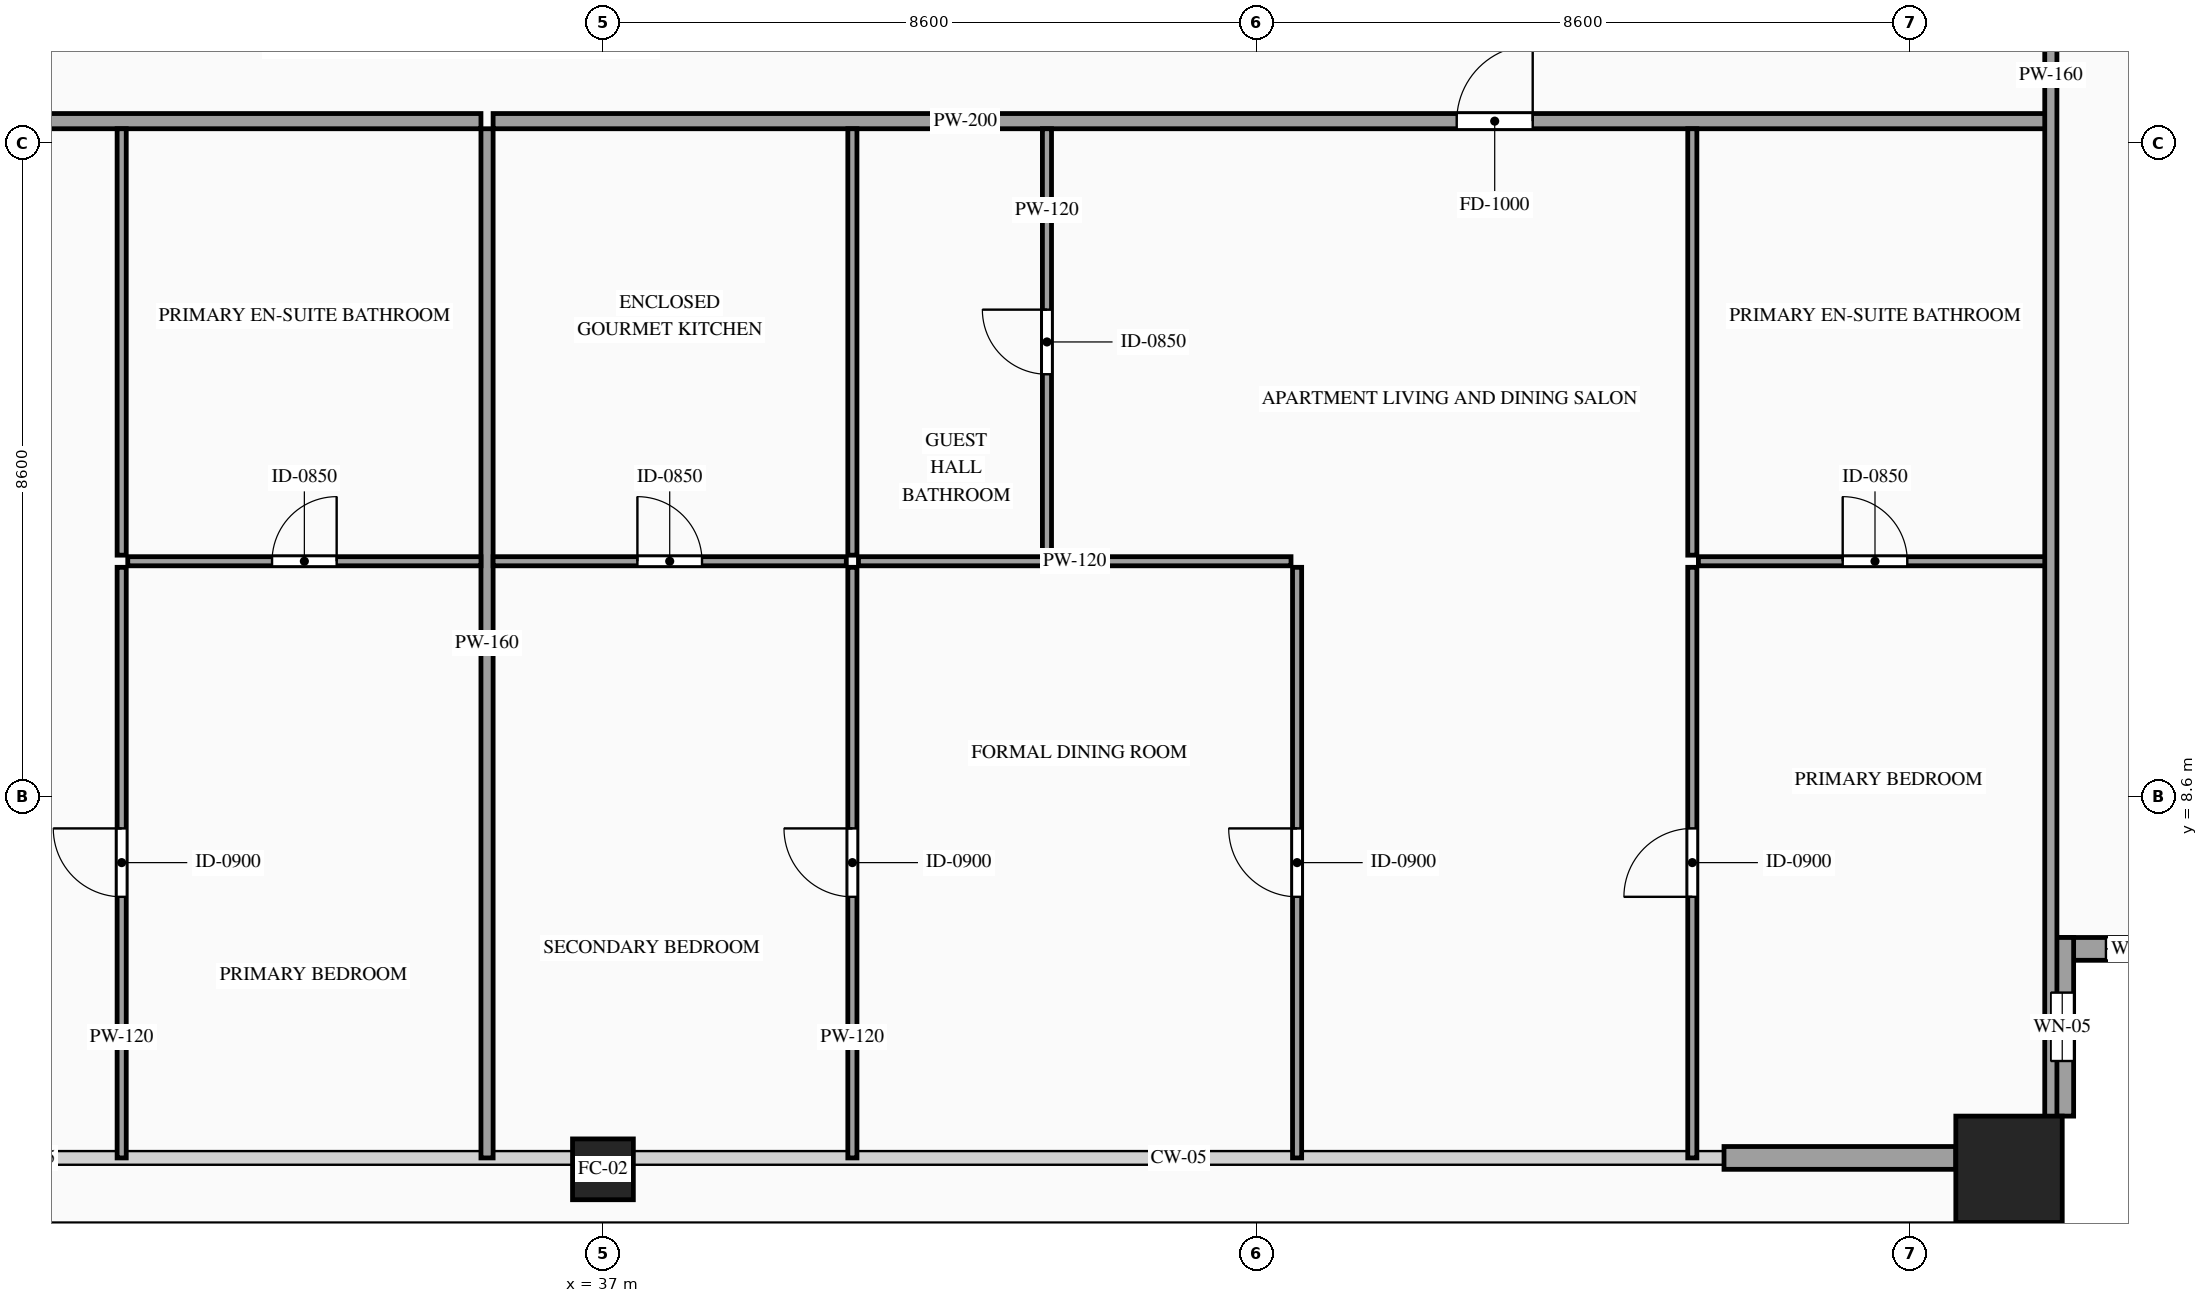
"""IFC4 building model, lengths in metres.
Left out: names, types, materials, properties, quantities, classifications, styles, units other than length and angle.
Written with IfcOpenShell. Run it as: python <this file> out.ifc"""

import sys

from ifc_helpers import new_model, si_unit, direction, frame, frame_2d, origin, origin_2d, place, context, subcontext, project, spatial, rectangle, hollow_rectangle, extrude, source, transform, mapped, element, fill, save


model = new_model("IFC4")
c1 = context("Model", 3, precision=1e-05, world=origin(), true_north=direction((0.0, 1.0)))
c2 = subcontext(c1, "Body", "Model", "MODEL_VIEW")
j1 = project(units=[si_unit("LENGTHUNIT", "METRE"), si_unit("PLANEANGLEUNIT", "RADIAN")], contexts=[c1])
p1 = place(None, origin())
s1 = spatial("IfcSite", under=j1, at=p1, CompositionType="ELEMENT")
p2 = place(p1, origin())
s2 = spatial("IfcBuilding", under=s1, at=p2, CompositionType="ELEMENT")
p3 = place(p2, frame((0.0, 0.0, 216.0)))
s3 = spatial("IfcBuildingStorey", under=s2, at=p3, CompositionType="ELEMENT", Elevation=216.0)
m1 = source(origin(), c2, "Body", "SweptSolid", [
    extrude(hollow_rectangle(XDim=0.8, YDim=0.8, WallThickness=0.036, at=origin_2d()), origin(), (0.0, 0.0, 1.0), 3.22),
])
p4 = place(p3, frame((37.0, 3.7, 0.0), z_axis=(0.0, 0.0, 1.0), x_axis=(1.0, 0.0, 0.0)))
e1 = element("IfcColumn", 1, at=p4, inside=s3, PredefinedType="COLUMN", context=c2, shape_type="MappedRepresentation", body=[
    mapped(m1, transform((0.0, 0.0, 0.0), scale=1.0)),
])
m2 = source(origin(), c2, "Body", "SweptSolid", [
    extrude(hollow_rectangle(XDim=1.4, YDim=1.4, WallThickness=0.06, at=origin_2d()), origin(), (0.0, 0.0, 1.0), 3.22),
])
p5 = place(p3, frame((55.5, 3.7, 0.0), z_axis=(0.0, 0.0, 1.0), x_axis=(1.0, 0.0, 0.0)))
e2 = element("IfcColumn", 2, at=p5, inside=s3, PredefinedType="COLUMN", context=c2, shape_type="MappedRepresentation", body=[
    mapped(m2, transform((0.0, 0.0, 0.0), scale=1.0)),
])
p6 = place(p3, frame((56.05, 6.6, 0.0), z_axis=(0.0, 0.0, 1.0), x_axis=(1.0, 0.0, 0.0)))
e3 = element("IfcWall", 3, at=p6, inside=s3, PredefinedType="SOLIDWALL", context=c2, shape_type="SweptSolid", body=[
    extrude(rectangle(XDim=2.35, YDim=0.3, at=frame_2d((1.175, 0.0))), origin(), (0.0, 0.0, 1.0), 3.22),
])
p7 = place(p6, frame((0.725, 0.0, 0.75)))
e4 = element("IfcOpeningElement", 4, at=p7, cuts=e3, PredefinedType="OPENING", context=c2, shape_type="SweptSolid", body=[
    extrude(rectangle(XDim=0.9, YDim=1.5, at=frame_2d((0.45, 0.75))), frame((0.0, 0.165, 0.0), z_axis=(0.0, -1.0, 0.0), x_axis=(1.0, 0.0, 0.0)), (0.0, 0.0, 1.0), 0.33),
])
p8 = place(p3, frame((56.2, 4.4, 0.0), z_axis=(0.0, 0.0, 1.0), x_axis=(0.0, 1.0, 0.0)))
e5 = element("IfcWall", 5, at=p8, inside=s3, PredefinedType="SOLIDWALL", context=c2, shape_type="SweptSolid", body=[
    extrude(rectangle(XDim=2.35, YDim=0.3, at=frame_2d((1.175, 0.0))), origin(), (0.0, 0.0, 1.0), 3.22),
])
p9 = place(p8, frame((0.725, 0.0, 0.75)))
e6 = element("IfcOpeningElement", 6, at=p9, cuts=e5, PredefinedType="OPENING", context=c2, shape_type="SweptSolid", body=[
    extrude(rectangle(XDim=0.9, YDim=1.5, at=frame_2d((0.45, 0.75))), frame((0.0, 0.165, 0.0), z_axis=(0.0, -1.0, 0.0), x_axis=(1.0, 0.0, 0.0)), (0.0, 0.0, 1.0), 0.33),
])
m3 = source(origin(), c2, "Body", "SweptSolid", [
    extrude(rectangle(XDim=3.05, YDim=0.3, at=frame_2d((1.525, 0.0))), origin(), (0.0, 0.0, 1.0), 2.775),
])
p10 = place(p3, frame((51.75, 3.85, 0.0), z_axis=(0.0, 0.0, 1.0), x_axis=(1.0, 0.0, 0.0)))
e7 = element("IfcWall", 7, at=p10, inside=s3, PredefinedType="SOLIDWALL", context=c2, shape_type="MappedRepresentation", body=[
    mapped(m3, transform((0.0, 0.0, 0.0), scale=1.0)),
])
p11 = place(p3, frame((17.94, 17.49, 0.0), z_axis=(0.0, 0.0, 1.0), x_axis=(1.0, 0.0, 0.0)))
e8 = element("IfcWall", 8, at=p11, inside=s3, PredefinedType="PARTITIONING", context=c2, shape_type="SweptSolid", body=[
    extrude(rectangle(XDim=17.455, YDim=0.2, at=frame_2d((8.728, 0.0))), origin(), (0.0, 0.0, 1.0), 3.22),
])
p12 = place(p11, frame((10.033, 0.0, 0.0)))
e9 = element("IfcOpeningElement", 9, at=p12, cuts=e8, PredefinedType="OPENING", context=c2, shape_type="SweptSolid", body=[
    extrude(rectangle(XDim=1.0, YDim=2.2, at=frame_2d((0.5, 1.1))), frame((0.0, 0.115, 0.0), z_axis=(0.0, -1.0, 0.0), x_axis=(1.0, 0.0, 0.0)), (0.0, 0.0, 1.0), 0.23),
])
m4 = source(origin(), c2, "Body", "SweptSolid", [
    extrude(rectangle(XDim=13.54, YDim=0.16, at=frame_2d((6.77, 0.0))), origin(), (0.0, 0.0, 1.0), 3.22),
])
p13 = place(p3, frame((35.475, 3.85, 0.0), z_axis=(0.0, 0.0, 1.0), x_axis=(0.0, 1.0, 0.0)))
e10 = element("IfcWall", 10, at=p13, inside=s3, PredefinedType="PARTITIONING", context=c2, shape_type="MappedRepresentation", body=[
    mapped(m4, transform((0.0, 0.0, 0.0), scale=1.0)),
])
p14 = place(p3, frame((30.748, 11.7, 0.0), z_axis=(0.0, 0.0, 1.0), x_axis=(1.0, 0.0, 0.0)))
e11 = element("IfcWall", 11, at=p14, inside=s3, PredefinedType="PARTITIONING", context=c2, shape_type="SweptSolid", body=[
    extrude(rectangle(XDim=4.647, YDim=0.12, at=frame_2d((2.323, 0.0))), origin(), (0.0, 0.0, 1.0), 3.22),
])
p15 = place(p14, frame((1.898, 0.0, 0.0)))
e12 = element("IfcOpeningElement", 12, at=p15, cuts=e11, PredefinedType="OPENING", context=c2, shape_type="SweptSolid", body=[
    extrude(rectangle(XDim=0.85, YDim=2.1, at=frame_2d((0.425, 1.05))), frame((0.0, 0.075, 0.0), z_axis=(0.0, -1.0, 0.0), x_axis=(1.0, 0.0, 0.0)), (0.0, 0.0, 1.0), 0.15),
])
m5 = source(origin(), c2, "Body", "SweptSolid", [
    extrude(rectangle(XDim=5.61, YDim=0.12, at=frame_2d((2.805, 0.0))), origin(), (0.0, 0.0, 1.0), 3.22),
])
p16 = place(p3, frame((30.668, 11.78, 0.0), z_axis=(0.0, 0.0, 1.0), x_axis=(0.0, 1.0, 0.0)))
e13 = element("IfcWall", 13, at=p16, inside=s3, PredefinedType="PARTITIONING", context=c2, shape_type="MappedRepresentation", body=[
    mapped(m5, transform((0.0, 0.0, 0.0), scale=1.0)),
])
p17 = place(p3, frame((30.668, 3.85, 0.0), z_axis=(0.0, 0.0, 1.0), x_axis=(0.0, 1.0, 0.0)))
e14 = element("IfcWall", 14, at=p17, inside=s3, PredefinedType="PARTITIONING", context=c2, shape_type="SweptSolid", body=[
    extrude(rectangle(XDim=7.77, YDim=0.12, at=frame_2d((3.885, 0.0))), origin(), (0.0, 0.0, 1.0), 3.22),
])
p18 = place(p17, frame((3.435, 0.0, 0.0)))
e15 = element("IfcOpeningElement", 15, at=p18, cuts=e14, PredefinedType="OPENING", context=c2, shape_type="SweptSolid", body=[
    extrude(rectangle(XDim=0.9, YDim=2.15, at=frame_2d((0.45, 1.075))), frame((0.0, 0.075, 0.0), z_axis=(0.0, -1.0, 0.0), x_axis=(1.0, 0.0, 0.0)), (0.0, 0.0, 1.0), 0.15),
])
p19 = place(p3, frame((35.555, 17.49, 0.0), z_axis=(0.0, 0.0, 1.0), x_axis=(1.0, 0.0, 0.0)))
e16 = element("IfcWall", 16, at=p19, inside=s3, PredefinedType="PARTITIONING", context=c2, shape_type="SweptSolid", body=[
    extrude(rectangle(XDim=20.505, YDim=0.2, at=frame_2d((10.252, 0.0))), origin(), (0.0, 0.0, 1.0), 3.22),
])
p20 = place(p19, frame((12.678, 0.0, 0.0)))
e17 = element("IfcOpeningElement", 17, at=p20, cuts=e16, PredefinedType="OPENING", context=c2, shape_type="SweptSolid", body=[
    extrude(rectangle(XDim=1.0, YDim=2.2, at=frame_2d((0.5, 1.1))), frame((0.0, 0.115, 0.0), z_axis=(0.0, -1.0, 0.0), x_axis=(1.0, 0.0, 0.0)), (0.0, 0.0, 1.0), 0.23),
])
p21 = place(p3, frame((35.555, 11.7, 0.0), z_axis=(0.0, 0.0, 1.0), x_axis=(1.0, 0.0, 0.0)))
e18 = element("IfcWall", 18, at=p21, inside=s3, PredefinedType="PARTITIONING", context=c2, shape_type="SweptSolid", body=[
    extrude(rectangle(XDim=4.647, YDim=0.12, at=frame_2d((2.323, 0.0))), origin(), (0.0, 0.0, 1.0), 3.22),
])
p22 = place(p21, frame((1.898, 0.0, 0.0)))
e19 = element("IfcOpeningElement", 19, at=p22, cuts=e18, PredefinedType="OPENING", context=c2, shape_type="SweptSolid", body=[
    extrude(rectangle(XDim=0.85, YDim=2.1, at=frame_2d((0.425, 1.05))), frame((0.0, 0.075, 0.0), z_axis=(0.0, -1.0, 0.0), x_axis=(1.0, 0.0, 0.0)), (0.0, 0.0, 1.0), 0.15),
])
p23 = place(p3, frame((40.282, 11.78, 0.0), z_axis=(0.0, 0.0, 1.0), x_axis=(0.0, 1.0, 0.0)))
e20 = element("IfcWall", 20, at=p23, inside=s3, PredefinedType="PARTITIONING", context=c2, shape_type="MappedRepresentation", body=[
    mapped(m5, transform((0.0, 0.0, 0.0), scale=1.0)),
])
p24 = place(p3, frame((42.842, 11.78, 0.0), z_axis=(0.0, 0.0, 1.0), x_axis=(0.0, 1.0, 0.0)))
e21 = element("IfcWall", 21, at=p24, inside=s3, PredefinedType="PARTITIONING", context=c2, shape_type="SweptSolid", body=[
    extrude(rectangle(XDim=5.61, YDim=0.12, at=frame_2d((2.805, 0.0))), origin(), (0.0, 0.0, 1.0), 3.22),
])
p25 = place(p24, frame((2.38, 0.0, 0.0)))
e22 = element("IfcOpeningElement", 22, at=p25, cuts=e21, PredefinedType="OPENING", context=c2, shape_type="SweptSolid", body=[
    extrude(rectangle(XDim=0.85, YDim=2.1, at=frame_2d((0.425, 1.05))), frame((0.0, 0.075, 0.0), z_axis=(0.0, -1.0, 0.0), x_axis=(1.0, 0.0, 0.0)), (0.0, 0.0, 1.0), 0.15),
])
p26 = place(p3, frame((51.413, 11.7, 0.0), z_axis=(0.0, 0.0, 1.0), x_axis=(1.0, 0.0, 0.0)))
e23 = element("IfcWall", 23, at=p26, inside=s3, PredefinedType="PARTITIONING", context=c2, shape_type="SweptSolid", body=[
    extrude(rectangle(XDim=4.647, YDim=0.12, at=frame_2d((2.323, 0.0))), origin(), (0.0, 0.0, 1.0), 3.22),
])
p27 = place(p26, frame((1.898, 0.0, 0.0)))
e24 = element("IfcOpeningElement", 24, at=p27, cuts=e23, PredefinedType="OPENING", context=c2, shape_type="SweptSolid", body=[
    extrude(rectangle(XDim=0.85, YDim=2.1, at=frame_2d((0.425, 1.05))), frame((0.0, 0.075, 0.0), z_axis=(0.0, -1.0, 0.0), x_axis=(1.0, 0.0, 0.0)), (0.0, 0.0, 1.0), 0.15),
])
m6 = source(origin(), c2, "Body", "SweptSolid", [
    extrude(rectangle(XDim=5.61, YDim=0.12, at=frame_2d((2.805, 0.0))), origin(), (0.0, 0.0, 1.0), 1.615),
])
p28 = place(p3, frame((51.333, 11.78, 0.0), z_axis=(0.0, 0.0, 1.0), x_axis=(0.0, 1.0, 0.0)))
e25 = element("IfcWall", 25, at=p28, inside=s3, PredefinedType="PARTITIONING", context=c2, shape_type="MappedRepresentation", body=[
    mapped(m6, transform((0.0, 0.0, 0.0), scale=1.0)),
])
p29 = place(p3, frame((40.282, 3.85, 0.0), z_axis=(0.0, 0.0, 1.0), x_axis=(0.0, 1.0, 0.0)))
e26 = element("IfcWall", 26, at=p29, inside=s3, PredefinedType="PARTITIONING", context=c2, shape_type="SweptSolid", body=[
    extrude(rectangle(XDim=7.77, YDim=0.12, at=frame_2d((3.885, 0.0))), origin(), (0.0, 0.0, 1.0), 3.22),
])
p30 = place(p29, frame((3.435, 0.0, 0.0)))
e27 = element("IfcOpeningElement", 27, at=p30, cuts=e26, PredefinedType="OPENING", context=c2, shape_type="SweptSolid", body=[
    extrude(rectangle(XDim=0.9, YDim=2.15, at=frame_2d((0.45, 1.075))), frame((0.0, 0.075, 0.0), z_axis=(0.0, -1.0, 0.0), x_axis=(1.0, 0.0, 0.0)), (0.0, 0.0, 1.0), 0.15),
])
p31 = place(p3, frame((51.333, 3.85, 0.0), z_axis=(0.0, 0.0, 1.0), x_axis=(0.0, 1.0, 0.0)))
e28 = element("IfcWall", 28, at=p31, inside=s3, PredefinedType="PARTITIONING", context=c2, shape_type="SweptSolid", body=[
    extrude(rectangle(XDim=7.77, YDim=0.12, at=frame_2d((3.885, 0.0))), origin(), (0.0, 0.0, 1.0), 3.22),
])
p32 = place(p31, frame((3.435, 0.0, 0.0)))
e29 = element("IfcOpeningElement", 29, at=p32, cuts=e28, PredefinedType="OPENING", context=c2, shape_type="SweptSolid", body=[
    extrude(rectangle(XDim=0.9, YDim=2.15, at=frame_2d((0.45, 1.075))), frame((0.0, 0.075, 0.0), z_axis=(0.0, -1.0, 0.0), x_axis=(1.0, 0.0, 0.0)), (0.0, 0.0, 1.0), 0.15),
])
m7 = source(origin(), c2, "Body", "SweptSolid", [
    extrude(rectangle(XDim=5.691, YDim=0.12, at=frame_2d((2.845, 0.0))), origin(), (0.0, 0.0, 1.0), 3.22),
])
p33 = place(p3, frame((40.362, 11.7, 0.0), z_axis=(0.0, 0.0, 1.0), x_axis=(1.0, 0.0, 0.0)))
e30 = element("IfcWall", 30, at=p33, inside=s3, PredefinedType="PARTITIONING", context=c2, shape_type="MappedRepresentation", body=[
    mapped(m7, transform((0.0, 0.0, 0.0), scale=1.0)),
])
p34 = place(p3, frame((46.133, 3.85, 0.0), z_axis=(0.0, 0.0, 1.0), x_axis=(0.0, 1.0, 0.0)))
e31 = element("IfcWall", 31, at=p34, inside=s3, PredefinedType="PARTITIONING", context=c2, shape_type="SweptSolid", body=[
    extrude(rectangle(XDim=7.77, YDim=0.12, at=frame_2d((3.885, 0.0))), origin(), (0.0, 0.0, 1.0), 3.22),
])
p35 = place(p34, frame((3.435, 0.0, 0.0)))
e32 = element("IfcOpeningElement", 32, at=p35, cuts=e31, PredefinedType="OPENING", context=c2, shape_type="SweptSolid", body=[
    extrude(rectangle(XDim=0.9, YDim=2.15, at=frame_2d((0.45, 1.075))), frame((0.0, 0.075, 0.0), z_axis=(0.0, -1.0, 0.0), x_axis=(1.0, 0.0, 0.0)), (0.0, 0.0, 1.0), 0.15),
])
m8 = source(origin(), c2, "Body", "SweptSolid", [
    extrude(rectangle(XDim=28.19, YDim=0.16, at=frame_2d((14.095, 0.0))), origin(), (0.0, 0.0, 1.0), 3.22),
])
p36 = place(p3, frame((56.05, 4.0, 0.0), z_axis=(0.0, 0.0, 1.0), x_axis=(0.0, 1.0, 0.0)))
e33 = element("IfcWall", 33, at=p36, inside=s3, PredefinedType="PARTITIONING", context=c2, shape_type="MappedRepresentation", body=[
    mapped(m8, transform((0.0, 0.0, 0.0), scale=1.0)),
])
m9 = source(origin(), c2, "Body", "SweptSolid", [
    extrude(rectangle(XDim=0.9, YDim=1.5, at=frame_2d((0.45, 0.75))), frame((0.0, 0.03, 0.0), z_axis=(0.0, -1.0, 0.0), x_axis=(1.0, 0.0, 0.0)), (0.0, 0.0, 1.0), 0.06),
])
p37 = place(p7, origin())
e34 = element("IfcWindow", 34, at=p37, inside=s3, PartitioningType="SINGLE_PANEL", PredefinedType="WINDOW", context=c2, shape_type="MappedRepresentation", body=[
    mapped(m9, transform((0.0, 0.0, 0.0), scale=1.0)),
])
fill(e4, e34)
p38 = place(p9, origin())
e35 = element("IfcWindow", 35, at=p38, inside=s3, PartitioningType="SINGLE_PANEL", PredefinedType="WINDOW", context=c2, shape_type="MappedRepresentation", body=[
    mapped(m9, transform((0.0, 0.0, 0.0), scale=1.0)),
])
fill(e6, e35)
m10 = source(origin(), c2, "Body", "SweptSolid", [
    extrude(rectangle(XDim=0.85, YDim=2.1, at=frame_2d((0.425, 1.05))), frame((0.0, 0.025, 0.0), z_axis=(0.0, -1.0, 0.0), x_axis=(1.0, 0.0, 0.0)), (0.0, 0.0, 1.0), 0.05),
])
p39 = place(p15, origin())
e36 = element("IfcDoor", 36, at=p39, inside=s3, OperationType="SINGLE_SWING_RIGHT", PredefinedType="DOOR", context=c2, shape_type="MappedRepresentation", body=[
    mapped(m10, transform((0.0, 0.0, 0.0), scale=1.0)),
])
fill(e12, e36)
m11 = source(origin(), c2, "Body", "SweptSolid", [
    extrude(rectangle(XDim=0.9, YDim=2.15, at=frame_2d((0.45, 1.075))), frame((0.0, 0.025, 0.0), z_axis=(0.0, -1.0, 0.0), x_axis=(1.0, 0.0, 0.0)), (0.0, 0.0, 1.0), 0.05),
])
p40 = place(p18, origin())
e37 = element("IfcDoor", 37, at=p40, inside=s3, OperationType="SINGLE_SWING_RIGHT", PredefinedType="DOOR", context=c2, shape_type="MappedRepresentation", body=[
    mapped(m11, transform((0.0, 0.0, 0.0), scale=1.0)),
])
fill(e15, e37)
m12 = source(origin(), c2, "Body", "SweptSolid", [
    extrude(rectangle(XDim=1.0, YDim=2.2, at=frame_2d((0.5, 1.1))), frame((0.0, 0.025, 0.0), z_axis=(0.0, -1.0, 0.0), x_axis=(1.0, 0.0, 0.0)), (0.0, 0.0, 1.0), 0.05),
])
p41 = place(p20, origin())
e38 = element("IfcDoor", 38, at=p41, inside=s3, OperationType="SINGLE_SWING_RIGHT", PredefinedType="DOOR", context=c2, shape_type="MappedRepresentation", body=[
    mapped(m12, transform((0.0, 0.0, 0.0), scale=1.0)),
])
fill(e17, e38)
p42 = place(p22, origin())
e39 = element("IfcDoor", 39, at=p42, inside=s3, OperationType="SINGLE_SWING_LEFT", PredefinedType="DOOR", context=c2, shape_type="MappedRepresentation", body=[
    mapped(m10, transform((0.0, 0.0, 0.0), scale=1.0)),
])
fill(e19, e39)
p43 = place(p25, origin())
e40 = element("IfcDoor", 40, at=p43, inside=s3, OperationType="SINGLE_SWING_RIGHT", PredefinedType="DOOR", context=c2, shape_type="MappedRepresentation", body=[
    mapped(m10, transform((0.0, 0.0, 0.0), scale=1.0)),
])
fill(e22, e40)
p44 = place(p27, origin())
e41 = element("IfcDoor", 41, at=p44, inside=s3, OperationType="SINGLE_SWING_LEFT", PredefinedType="DOOR", context=c2, shape_type="MappedRepresentation", body=[
    mapped(m10, transform((0.0, 0.0, 0.0), scale=1.0)),
])
fill(e24, e41)
p45 = place(p30, origin())
e42 = element("IfcDoor", 42, at=p45, inside=s3, OperationType="SINGLE_SWING_RIGHT", PredefinedType="DOOR", context=c2, shape_type="MappedRepresentation", body=[
    mapped(m11, transform((0.0, 0.0, 0.0), scale=1.0)),
])
fill(e27, e42)
p46 = place(p32, origin())
e43 = element("IfcDoor", 43, at=p46, inside=s3, OperationType="SINGLE_SWING_LEFT", PredefinedType="DOOR", context=c2, shape_type="MappedRepresentation", body=[
    mapped(m11, transform((0.0, 0.0, 0.0), scale=1.0)),
])
fill(e29, e43)
p47 = place(p35, origin())
e44 = element("IfcDoor", 44, at=p47, inside=s3, OperationType="SINGLE_SWING_RIGHT", PredefinedType="DOOR", context=c2, shape_type="MappedRepresentation", body=[
    mapped(m11, transform((0.0, 0.0, 0.0), scale=1.0)),
])
fill(e32, e44)
save(model, sys.argv[1])
